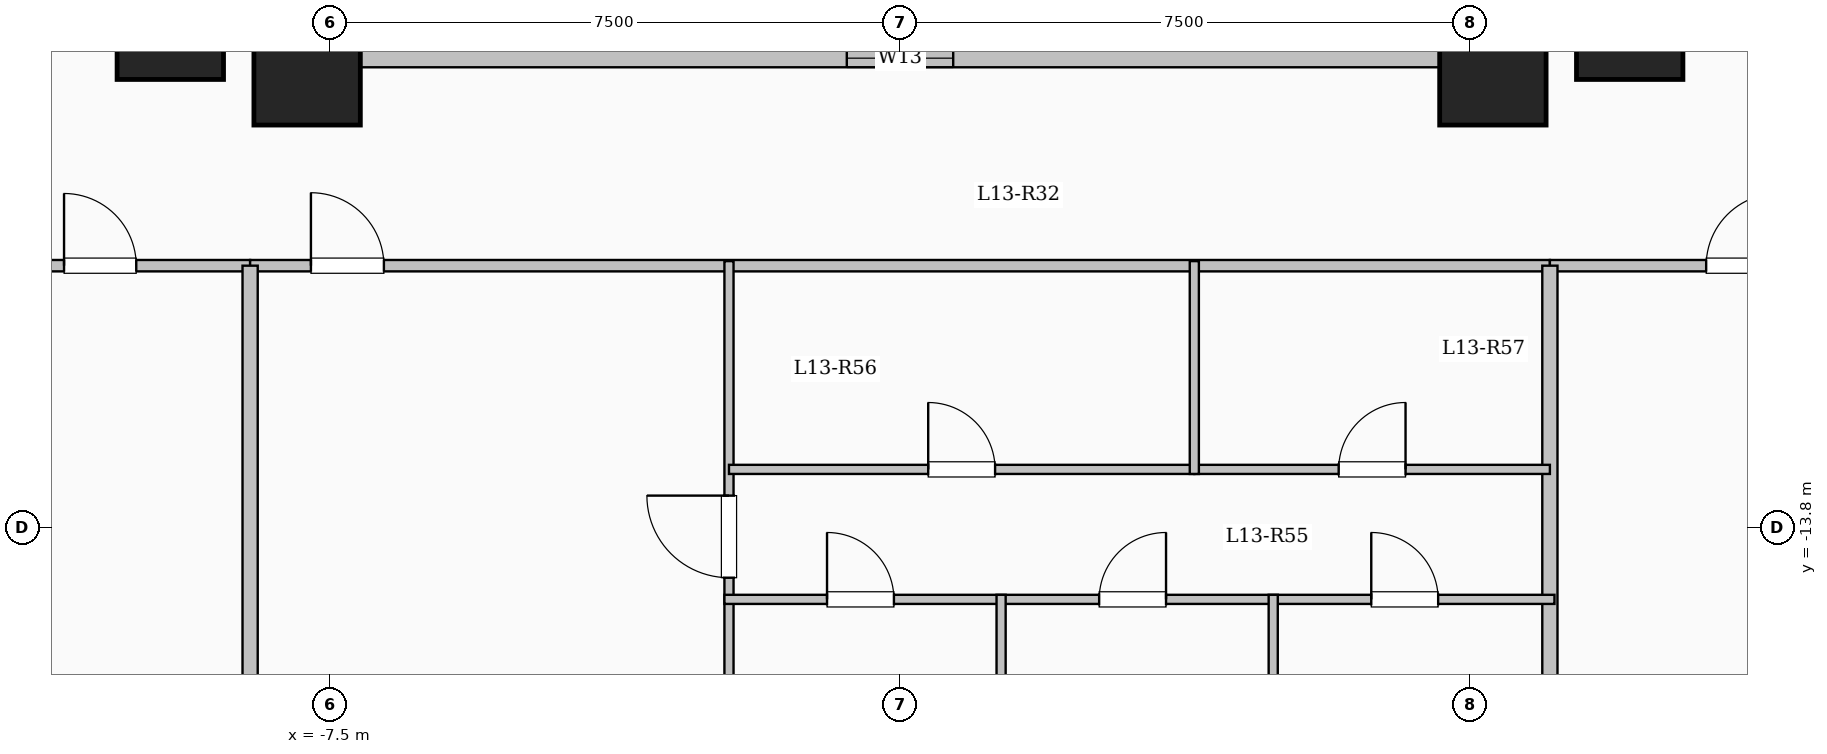
"""IFC4 building model, lengths in metres.
Left out: names, types, materials, properties, quantities, classifications, styles, units other than length and angle.
Written with IfcOpenShell. Run it as: python <this file> out.ifc"""

import sys

from ifc_helpers import new_model, si_unit, direction, frame, frame_2d, origin, origin_2d, place, context, subcontext, project, spatial, rectangle, extrude, element, fill, save


model = new_model("IFC4")
c1 = context("Model", 3, precision=1e-05, world=origin(), true_north=direction((0.0, 1.0)))
c2 = subcontext(c1, "Body", "Model", "MODEL_VIEW")
j1 = project(units=[si_unit("LENGTHUNIT", "METRE"), si_unit("PLANEANGLEUNIT", "RADIAN")], contexts=[c1])
p1 = place(None, origin())
s1 = spatial("IfcSite", under=j1, at=p1, CompositionType="ELEMENT")
p2 = place(p1, origin())
s2 = spatial("IfcBuilding", under=s1, at=p2, CompositionType="ELEMENT")
p3 = place(p2, frame((0.0, 0.0, 50.8)))
s3 = spatial("IfcBuildingStorey", under=s2, at=p3, CompositionType="ELEMENT", Elevation=50.8)
for number, where, z_axis, x_axis in (
    (1, (-7.8, -7.8, 0.0), (0.0, 0.0, 1.0), (1.0, 0.0, 0.0)),
    (2, (7.8, -7.8, 0.0), (0.0, 0.0, 1.0), (1.0, 0.0, 0.0)),
    (3, (-9.6, -7.2, 0.0), (0.0, 0.0, 1.0), (1.0, 0.0, 0.0)),
    (4, (9.6, -7.2, 0.0), (0.0, 0.0, 1.0), (1.0, 0.0, 0.0)),
):
    element("IfcColumn", number, at=place(p3, frame(where, z_axis=z_axis, x_axis=x_axis)), inside=s3, PredefinedType="COLUMN", context=c2, shape_type="SweptSolid", body=[
        extrude(rectangle(XDim=1.4, YDim=1.4, at=origin_2d()), origin(), (0.0, 0.0, 1.0), 3.35),
    ])
p4 = place(p3, frame((-7.62, -7.62, 0.0), z_axis=(0.0, 0.0, 1.0), x_axis=(1.0, 0.0, 0.0)))
e5 = element("IfcWall", 5, at=p4, inside=s3, PredefinedType="SOLIDWALL", context=c2, shape_type="SweptSolid", body=[
    extrude(rectangle(XDim=15.24, YDim=0.24, at=frame_2d((7.62, 0.0))), origin(), (0.0, 0.0, 1.0), 3.1),
])
p5 = place(p4, frame((6.92, 0.0, 0.95)))
e6 = element("IfcOpeningElement", 6, at=p5, cuts=e5, PredefinedType="OPENING", context=c2, shape_type="SweptSolid", body=[
    extrude(rectangle(XDim=1.4, YDim=1.5, at=frame_2d((0.7, 0.75))), frame((0.0, 0.13, 0.0), z_axis=(0.0, -1.0, 0.0), x_axis=(1.0, 0.0, 0.0)), (0.0, 0.0, 1.0), 0.26),
])
p6 = place(p3, frame((7.62, -7.62, 0.0), z_axis=(0.0, 0.0, 1.0), x_axis=(0.0, 1.0, 0.0)))
e7 = element("IfcWall", 7, at=p6, inside=s3, PredefinedType="SOLIDWALL", context=c2, shape_type="SweptSolid", body=[
    extrude(rectangle(XDim=15.24, YDim=0.24, at=frame_2d((7.62, 0.0))), origin(), (0.0, 0.0, 1.0), 3.1),
])
p7 = place(p6, frame((6.92, 0.0, 0.95)))
e8 = element("IfcOpeningElement", 8, at=p7, cuts=e7, PredefinedType="OPENING", context=c2, shape_type="SweptSolid", body=[
    extrude(rectangle(XDim=1.4, YDim=1.5, at=frame_2d((0.7, 0.75))), frame((0.0, 0.13, 0.0), z_axis=(0.0, -1.0, 0.0), x_axis=(1.0, 0.0, 0.0)), (0.0, 0.0, 1.0), 0.26),
])
p8 = place(p3, frame((-7.62, 7.62, 0.0), z_axis=(0.0, 0.0, 1.0), x_axis=(0.0, -1.0, 0.0)))
e9 = element("IfcWall", 9, at=p8, inside=s3, PredefinedType="SOLIDWALL", context=c2, shape_type="SweptSolid", body=[
    extrude(rectangle(XDim=15.24, YDim=0.24, at=frame_2d((7.62, 0.0))), origin(), (0.0, 0.0, 1.0), 3.1),
])
p9 = place(p8, frame((6.92, 0.0, 0.95)))
e10 = element("IfcOpeningElement", 10, at=p9, cuts=e9, PredefinedType="OPENING", context=c2, shape_type="SweptSolid", body=[
    extrude(rectangle(XDim=1.4, YDim=1.5, at=frame_2d((0.7, 0.75))), frame((0.0, 0.13, 0.0), z_axis=(0.0, -1.0, 0.0), x_axis=(1.0, 0.0, 0.0)), (0.0, 0.0, 1.0), 0.26),
])
p10 = place(p3, frame((-22.55, -10.35, 0.0), z_axis=(0.0, 0.0, 1.0), x_axis=(1.0, 0.0, 0.0)))
e11 = element("IfcWall", 11, at=p10, inside=s3, PredefinedType="PARTITIONING", context=c2, shape_type="SweptSolid", body=[
    extrude(rectangle(XDim=14.0, YDim=0.15, at=frame_2d((7.0, 0.0))), origin(), (0.0, 0.0, 1.0), 3.1),
])
p11 = place(p10, frame((2.006, 0.0, 0.0)))
e12 = element("IfcOpeningElement", 12, at=p11, cuts=e11, PredefinedType="OPENING", context=c2, shape_type="SweptSolid", body=[
    extrude(rectangle(XDim=0.95, YDim=2.15, at=frame_2d((0.475, 1.075))), frame((0.0, 0.085, 0.0), z_axis=(0.0, -1.0, 0.0), x_axis=(1.0, 0.0, 0.0)), (0.0, 0.0, 1.0), 0.17),
])
p12 = place(p10, frame((7.058, 0.0, 0.0)))
e13 = element("IfcOpeningElement", 13, at=p12, cuts=e11, PredefinedType="OPENING", context=c2, shape_type="SweptSolid", body=[
    extrude(rectangle(XDim=0.95, YDim=2.15, at=frame_2d((0.475, 1.075))), frame((0.0, 0.085, 0.0), z_axis=(0.0, -1.0, 0.0), x_axis=(1.0, 0.0, 0.0)), (0.0, 0.0, 1.0), 0.17),
])
p13 = place(p10, frame((11.552, 0.0, 0.0)))
e14 = element("IfcOpeningElement", 14, at=p13, cuts=e11, PredefinedType="OPENING", context=c2, shape_type="SweptSolid", body=[
    extrude(rectangle(XDim=0.95, YDim=2.15, at=frame_2d((0.475, 1.075))), frame((0.0, 0.085, 0.0), z_axis=(0.0, -1.0, 0.0), x_axis=(1.0, 0.0, 0.0)), (0.0, 0.0, 1.0), 0.17),
])
p14 = place(p3, frame((-8.55, -10.35, 0.0), z_axis=(0.0, 0.0, 1.0), x_axis=(1.0, 0.0, 0.0)))
e15 = element("IfcWall", 15, at=p14, inside=s3, PredefinedType="PARTITIONING", context=c2, shape_type="SweptSolid", body=[
    extrude(rectangle(XDim=17.1, YDim=0.15, at=frame_2d((8.55, 0.0))), origin(), (0.0, 0.0, 1.0), 3.1),
])
p15 = place(p14, frame((0.8, 0.0, 0.0)))
e16 = element("IfcOpeningElement", 16, at=p15, cuts=e15, PredefinedType="OPENING", context=c2, shape_type="SweptSolid", body=[
    extrude(rectangle(XDim=0.96, YDim=2.15, at=frame_2d((0.48, 1.075))), frame((0.0, 0.085, 0.0), z_axis=(0.0, -1.0, 0.0), x_axis=(1.0, 0.0, 0.0)), (0.0, 0.0, 1.0), 0.17),
])
p16 = place(p3, frame((8.55, -10.35, 0.0), z_axis=(0.0, 0.0, 1.0), x_axis=(1.0, 0.0, 0.0)))
e17 = element("IfcWall", 17, at=p16, inside=s3, PredefinedType="PARTITIONING", context=c2, shape_type="SweptSolid", body=[
    extrude(rectangle(XDim=14.0, YDim=0.15, at=frame_2d((7.0, 0.0))), origin(), (0.0, 0.0, 1.0), 3.1),
])
p17 = place(p16, frame((2.056, 0.0, 0.0)))
e18 = element("IfcOpeningElement", 18, at=p17, cuts=e17, PredefinedType="OPENING", context=c2, shape_type="SweptSolid", body=[
    extrude(rectangle(XDim=0.95, YDim=2.15, at=frame_2d((0.475, 1.075))), frame((0.0, 0.085, 0.0), z_axis=(0.0, -1.0, 0.0), x_axis=(1.0, 0.0, 0.0)), (0.0, 0.0, 1.0), 0.17),
])
p18 = place(p16, frame((7.108, 0.0, 0.0)))
e19 = element("IfcOpeningElement", 19, at=p18, cuts=e17, PredefinedType="OPENING", context=c2, shape_type="SweptSolid", body=[
    extrude(rectangle(XDim=0.95, YDim=2.15, at=frame_2d((0.475, 1.075))), frame((0.0, 0.085, 0.0), z_axis=(0.0, -1.0, 0.0), x_axis=(1.0, 0.0, 0.0)), (0.0, 0.0, 1.0), 0.17),
])
p19 = place(p16, frame((11.602, 0.0, 0.0)))
e20 = element("IfcOpeningElement", 20, at=p19, cuts=e17, PredefinedType="OPENING", context=c2, shape_type="SweptSolid", body=[
    extrude(rectangle(XDim=0.95, YDim=2.15, at=frame_2d((0.475, 1.075))), frame((0.0, 0.085, 0.0), z_axis=(0.0, -1.0, 0.0), x_axis=(1.0, 0.0, 0.0)), (0.0, 0.0, 1.0), 0.17),
])
for number, where, z_axis, x_axis in (
    (21, (-8.55, -24.204, 0.0), (0.0, 0.0, 1.0), (0.0, 1.0, 0.0)),
    (22, (8.55, -24.204, 0.0), (0.0, 0.0, 1.0), (0.0, 1.0, 0.0)),
):
    element("IfcWall", number, at=place(p3, frame(where, z_axis=z_axis, x_axis=x_axis)), inside=s3, PredefinedType="SOLIDWALL", context=c2, shape_type="SweptSolid", body=[
        extrude(rectangle(XDim=13.854, YDim=0.2, at=frame_2d((6.927, 0.0))), origin(), (0.0, 0.0, 1.0), 3.1),
    ])
p20 = place(p3, frame((-2.25, -25.08, 0.0), z_axis=(0.0, 0.0, 1.0), x_axis=(0.0, 1.0, 0.0)))
e23 = element("IfcWall", 23, at=p20, inside=s3, PredefinedType="PARTITIONING", context=c2, shape_type="SweptSolid", body=[
    extrude(rectangle(XDim=14.79, YDim=0.12, at=frame_2d((7.395, 0.0))), origin(), (0.0, 0.0, 1.0), 3.1),
])
p21 = place(p20, frame((10.625, 0.0, 0.0)))
e24 = element("IfcOpeningElement", 24, at=p21, cuts=e23, PredefinedType="OPENING", context=c2, shape_type="SweptSolid", body=[
    extrude(rectangle(XDim=1.08, YDim=2.15, at=frame_2d((0.54, 1.075))), frame((0.0, 0.07, 0.0), z_axis=(0.0, -1.0, 0.0), x_axis=(1.0, 0.0, 0.0)), (0.0, 0.0, 1.0), 0.14),
])
p22 = place(p3, frame((-2.25, -13.03, 0.0), z_axis=(0.0, 0.0, 1.0), x_axis=(1.0, 0.0, 0.0)))
e25 = element("IfcWall", 25, at=p22, inside=s3, PredefinedType="PARTITIONING", context=c2, shape_type="SweptSolid", body=[
    extrude(rectangle(XDim=6.122, YDim=0.12, at=frame_2d((3.061, 0.0))), origin(), (0.0, 0.0, 1.0), 2.585),
])
p23 = place(p22, frame((2.621, 0.0, 0.0)))
e26 = element("IfcOpeningElement", 26, at=p23, cuts=e25, PredefinedType="OPENING", context=c2, shape_type="SweptSolid", body=[
    extrude(rectangle(XDim=0.88, YDim=2.1, at=frame_2d((0.44, 1.05))), frame((0.0, 0.07, 0.0), z_axis=(0.0, -1.0, 0.0), x_axis=(1.0, 0.0, 0.0)), (0.0, 0.0, 1.0), 0.14),
])
p24 = place(p3, frame((3.872, -13.03, 0.0), z_axis=(0.0, 0.0, 1.0), x_axis=(1.0, 0.0, 0.0)))
e27 = element("IfcWall", 27, at=p24, inside=s3, PredefinedType="PARTITIONING", context=c2, shape_type="SweptSolid", body=[
    extrude(rectangle(XDim=4.678, YDim=0.12, at=frame_2d((2.339, 0.0))), origin(), (0.0, 0.0, 1.0), 2.585),
])
p25 = place(p24, frame((1.899, 0.0, 0.0)))
e28 = element("IfcOpeningElement", 28, at=p25, cuts=e27, PredefinedType="OPENING", context=c2, shape_type="SweptSolid", body=[
    extrude(rectangle(XDim=0.88, YDim=2.1, at=frame_2d((0.44, 1.05))), frame((0.0, 0.07, 0.0), z_axis=(0.0, -1.0, 0.0), x_axis=(1.0, 0.0, 0.0)), (0.0, 0.0, 1.0), 0.14),
])
p26 = place(p3, frame((-2.31, -14.74, 0.0), z_axis=(0.0, 0.0, 1.0), x_axis=(1.0, 0.0, 0.0)))
e29 = element("IfcWall", 29, at=p26, inside=s3, PredefinedType="PARTITIONING", context=c2, shape_type="SweptSolid", body=[
    extrude(rectangle(XDim=10.92, YDim=0.12, at=frame_2d((5.46, 0.0))), origin(), (0.0, 0.0, 1.0), 2.585),
])
p27 = place(p26, frame((1.35, 0.0, 0.0)))
e30 = element("IfcOpeningElement", 30, at=p27, cuts=e29, PredefinedType="OPENING", context=c2, shape_type="SweptSolid", body=[
    extrude(rectangle(XDim=0.88, YDim=2.1, at=frame_2d((0.44, 1.05))), frame((0.0, 0.07, 0.0), z_axis=(0.0, -1.0, 0.0), x_axis=(1.0, 0.0, 0.0)), (0.0, 0.0, 1.0), 0.14),
])
p28 = place(p26, frame((4.93, 0.0, 0.0)))
e31 = element("IfcOpeningElement", 31, at=p28, cuts=e29, PredefinedType="OPENING", context=c2, shape_type="SweptSolid", body=[
    extrude(rectangle(XDim=0.88, YDim=2.1, at=frame_2d((0.44, 1.05))), frame((0.0, 0.07, 0.0), z_axis=(0.0, -1.0, 0.0), x_axis=(1.0, 0.0, 0.0)), (0.0, 0.0, 1.0), 0.14),
])
p29 = place(p26, frame((8.51, 0.0, 0.0)))
e32 = element("IfcOpeningElement", 32, at=p29, cuts=e29, PredefinedType="OPENING", context=c2, shape_type="SweptSolid", body=[
    extrude(rectangle(XDim=0.88, YDim=2.1, at=frame_2d((0.44, 1.05))), frame((0.0, 0.07, 0.0), z_axis=(0.0, -1.0, 0.0), x_axis=(1.0, 0.0, 0.0)), (0.0, 0.0, 1.0), 0.14),
])
p30 = place(p3, frame((3.872, -13.09, 0.0), z_axis=(0.0, 0.0, 1.0), x_axis=(0.0, 1.0, 0.0)))
e33 = element("IfcWall", 33, at=p30, inside=s3, PredefinedType="PARTITIONING", context=c2, shape_type="SweptSolid", body=[
    extrude(rectangle(XDim=2.8, YDim=0.12, at=frame_2d((1.4, 0.0))), origin(), (0.0, 0.0, 1.0), 3.1),
])
for number, where, z_axis, x_axis in (
    (34, (1.33, -25.08, 0.0), (0.0, 0.0, 1.0), (0.0, 1.0, 0.0)),
    (35, (4.91, -25.08, 0.0), (0.0, 0.0, 1.0), (0.0, 1.0, 0.0)),
):
    element("IfcWall", number, at=place(p3, frame(where, z_axis=z_axis, x_axis=x_axis)), inside=s3, PredefinedType="PARTITIONING", context=c2, shape_type="SweptSolid", body=[
        extrude(rectangle(XDim=10.4, YDim=0.12, at=frame_2d((5.2, 0.0))), origin(), (0.0, 0.0, 1.0), 3.1),
    ])
p31 = place(p5, origin())
e36 = element("IfcWindow", 36, at=p31, inside=s3, PartitioningType="SINGLE_PANEL", PredefinedType="WINDOW", context=c2, shape_type="SweptSolid", body=[
    extrude(rectangle(XDim=1.4, YDim=1.5, at=frame_2d((0.7, 0.75))), frame((0.0, 0.03, 0.0), z_axis=(0.0, -1.0, 0.0), x_axis=(1.0, 0.0, 0.0)), (0.0, 0.0, 1.0), 0.06),
])
fill(e6, e36)
p32 = place(p13, origin())
e37 = element("IfcDoor", 37, at=p32, inside=s3, OperationType="SINGLE_SWING_LEFT", PredefinedType="DOOR", context=c2, shape_type="SweptSolid", body=[
    extrude(rectangle(XDim=0.95, YDim=2.15, at=frame_2d((0.475, 1.075))), frame((0.0, 0.025, 0.0), z_axis=(0.0, -1.0, 0.0), x_axis=(1.0, 0.0, 0.0)), (0.0, 0.0, 1.0), 0.05),
])
fill(e14, e37)
p33 = place(p17, origin())
e38 = element("IfcDoor", 38, at=p33, inside=s3, OperationType="SINGLE_SWING_RIGHT", PredefinedType="DOOR", context=c2, shape_type="SweptSolid", body=[
    extrude(rectangle(XDim=0.95, YDim=2.15, at=frame_2d((0.475, 1.075))), frame((0.0, 0.025, 0.0), z_axis=(0.0, -1.0, 0.0), x_axis=(1.0, 0.0, 0.0)), (0.0, 0.0, 1.0), 0.05),
])
fill(e18, e38)
p34 = place(p15, origin())
e39 = element("IfcDoor", 39, at=p34, inside=s3, OperationType="SINGLE_SWING_LEFT", PredefinedType="DOOR", context=c2, shape_type="SweptSolid", body=[
    extrude(rectangle(XDim=0.96, YDim=2.15, at=frame_2d((0.48, 1.075))), frame((0.0, 0.025, 0.0), z_axis=(0.0, -1.0, 0.0), x_axis=(1.0, 0.0, 0.0)), (0.0, 0.0, 1.0), 0.05),
])
fill(e16, e39)
p35 = place(p21, origin())
e40 = element("IfcDoor", 40, at=p35, inside=s3, OperationType="SINGLE_SWING_RIGHT", PredefinedType="DOOR", context=c2, shape_type="SweptSolid", body=[
    extrude(rectangle(XDim=1.08, YDim=2.15, at=frame_2d((0.54, 1.075))), frame((0.0, 0.025, 0.0), z_axis=(0.0, -1.0, 0.0), x_axis=(1.0, 0.0, 0.0)), (0.0, 0.0, 1.0), 0.05),
])
fill(e24, e40)
p36 = place(p23, origin())
e41 = element("IfcDoor", 41, at=p36, inside=s3, OperationType="SINGLE_SWING_LEFT", PredefinedType="DOOR", context=c2, shape_type="SweptSolid", body=[
    extrude(rectangle(XDim=0.88, YDim=2.1, at=frame_2d((0.44, 1.05))), frame((0.0, 0.025, 0.0), z_axis=(0.0, -1.0, 0.0), x_axis=(1.0, 0.0, 0.0)), (0.0, 0.0, 1.0), 0.05),
])
fill(e26, e41)
p37 = place(p25, origin())
e42 = element("IfcDoor", 42, at=p37, inside=s3, OperationType="SINGLE_SWING_RIGHT", PredefinedType="DOOR", context=c2, shape_type="SweptSolid", body=[
    extrude(rectangle(XDim=0.88, YDim=2.1, at=frame_2d((0.44, 1.05))), frame((0.0, 0.025, 0.0), z_axis=(0.0, -1.0, 0.0), x_axis=(1.0, 0.0, 0.0)), (0.0, 0.0, 1.0), 0.05),
])
fill(e28, e42)
p38 = place(p27, origin())
e43 = element("IfcDoor", 43, at=p38, inside=s3, OperationType="SINGLE_SWING_LEFT", PredefinedType="DOOR", context=c2, shape_type="SweptSolid", body=[
    extrude(rectangle(XDim=0.88, YDim=2.1, at=frame_2d((0.44, 1.05))), frame((0.0, 0.025, 0.0), z_axis=(0.0, -1.0, 0.0), x_axis=(1.0, 0.0, 0.0)), (0.0, 0.0, 1.0), 0.05),
])
fill(e30, e43)
p39 = place(p28, origin())
e44 = element("IfcDoor", 44, at=p39, inside=s3, OperationType="SINGLE_SWING_RIGHT", PredefinedType="DOOR", context=c2, shape_type="SweptSolid", body=[
    extrude(rectangle(XDim=0.88, YDim=2.1, at=frame_2d((0.44, 1.05))), frame((0.0, 0.025, 0.0), z_axis=(0.0, -1.0, 0.0), x_axis=(1.0, 0.0, 0.0)), (0.0, 0.0, 1.0), 0.05),
])
fill(e31, e44)
p40 = place(p29, origin())
e45 = element("IfcDoor", 45, at=p40, inside=s3, OperationType="SINGLE_SWING_LEFT", PredefinedType="DOOR", context=c2, shape_type="SweptSolid", body=[
    extrude(rectangle(XDim=0.88, YDim=2.1, at=frame_2d((0.44, 1.05))), frame((0.0, 0.025, 0.0), z_axis=(0.0, -1.0, 0.0), x_axis=(1.0, 0.0, 0.0)), (0.0, 0.0, 1.0), 0.05),
])
fill(e32, e45)
save(model, sys.argv[1])
